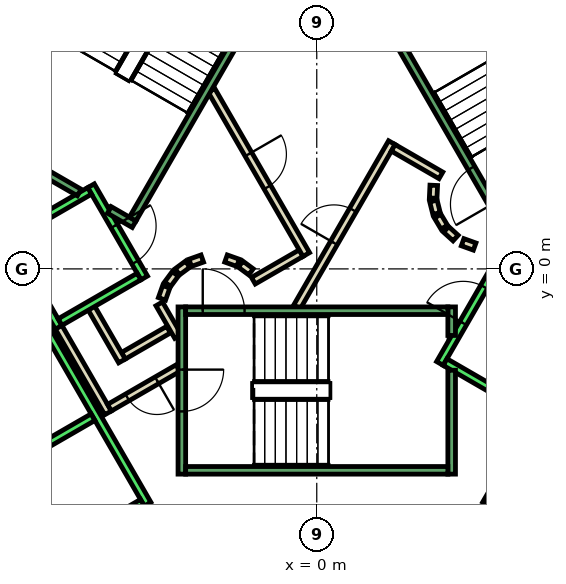
"""IFC4 building model, lengths in metres.
Left out: names, types, materials, properties, quantities, classifications, styles, units other than length and angle.
Written with IfcOpenShell. Run it as: python <this file> out.ifc"""

import sys

from ifc_helpers import new_model, si_unit, direction, frame, frame_2d, origin, place, context, subcontext, project, spatial, polyline, rectangle, outline, extrude, element, fill, save


model = new_model("IFC4")
c1 = context("Model", 3, precision=1e-05, world=origin(), true_north=direction((0.0, 1.0)))
c2 = subcontext(c1, "Body", "Model", "MODEL_VIEW")
j1 = project(units=[si_unit("LENGTHUNIT", "METRE"), si_unit("PLANEANGLEUNIT", "RADIAN")], contexts=[c1])
p1 = place(None, origin())
s1 = spatial("IfcSite", under=j1, at=p1, CompositionType="ELEMENT")
p2 = place(p1, origin())
s2 = spatial("IfcBuilding", under=s1, at=p2, CompositionType="ELEMENT")
p3 = place(p2, frame((0.0, 0.0, 132.8)))
s3 = spatial("IfcBuildingStorey", under=s2, at=p3, CompositionType="ELEMENT", Elevation=132.8)
p4 = place(p3, frame((0.0, 0.0, -0.6)))
e1 = element("IfcWall", 1, at=p4, inside=s3, PredefinedType="SHEAR", context=c2, shape_type="SweptSolid", body=[
    extrude(outline(polyline([(-12.267, 5.252), (-11.575, 4.852), (-6.466, 13.7), (-6.928, 14.5), (-12.267, 5.252)])), origin(), (0.0, 0.0, 1.0), 5.4),
])
p5 = place(p3, frame((0.0, 0.0, -0.6)))
e2 = element("IfcWall", 2, at=p5, inside=s3, PredefinedType="SHEAR", context=c2, shape_type="SweptSolid", body=[
    extrude(outline(polyline([(-13.856, 2.5), (-6.928, -9.5), (-6.466, -8.7), (-12.933, 2.5), (-13.856, 2.5)])), origin(), (0.0, 0.0, 1.0), 5.4),
])
p6 = place(p3, frame((-3.9, -1.599, 0.0), z_axis=(0.0, 0.0, 1.0), x_axis=(-0.865969445389, -0.500096910261, 0.0)))
e3 = element("IfcWall", 3, at=p6, inside=s3, PredefinedType="PARTITIONING", context=c2, shape_type="SweptSolid", body=[
    extrude(rectangle(XDim=1.373, YDim=0.2, at=frame_2d((0.687, 0.0))), origin(), (0.0, 0.0, 1.0), 4.8),
])
p7 = place(p3, frame((-5.126, -2.422, 0.0), z_axis=(0.0, 0.0, 1.0), x_axis=(-0.500062241894, 0.865989465428, 0.0)))
e4 = element("IfcWall", 4, at=p7, inside=s3, PredefinedType="PARTITIONING", context=c2, shape_type="SweptSolid", body=[
    extrude(rectangle(XDim=1.7, YDim=0.2, at=frame_2d((0.85, 0.0))), origin(), (0.0, 0.0, 1.0), 4.8),
])
p8 = place(p3, frame((-5.492, -3.788, 0.0), z_axis=(0.0, 0.0, 1.0), x_axis=(-0.500008949224, 0.866020236886, 0.0)))
e5 = element("IfcWall", 5, at=p8, inside=s3, PredefinedType="PARTITIONING", context=c2, shape_type="SweptSolid", body=[
    extrude(rectangle(XDim=2.68, YDim=0.2, at=frame_2d((1.34, 0.0))), origin(), (0.0, 0.0, 1.0), 4.8),
])
p9 = place(p3, frame((-4.145, -0.92, 0.0), z_axis=(0.0, 0.0, 1.0), x_axis=(0.499743786207, -0.866173278362, 0.0)))
e6 = element("IfcWall", 6, at=p9, inside=s3, PredefinedType="PARTITIONING", context=c2, shape_type="SweptSolid", body=[
    extrude(rectangle(XDim=0.991, YDim=0.2, at=frame_2d((0.495, 0.0))), origin(), (0.0, 0.0, 1.0), 4.8),
])
p10 = place(p3, frame((-3.65, -2.61, 0.0), z_axis=(0.0, 0.0, 1.0), x_axis=(-0.866072462134, -0.499918483688, 0.0)))
e7 = element("IfcWall", 7, at=p10, inside=s3, PredefinedType="PARTITIONING", context=c2, shape_type="SweptSolid", body=[
    extrude(rectangle(XDim=2.084, YDim=0.2, at=frame_2d((1.042, 0.0))), origin(), (0.0, 0.0, 1.0), 4.8),
])
p11 = place(p10, frame((0.642, 0.0, 0.0)))
e8 = element("IfcOpeningElement", 8, at=p11, cuts=e7, PredefinedType="OPENING", context=c2, shape_type="SweptSolid", body=[
    extrude(rectangle(XDim=0.9, YDim=2.1, at=frame_2d((0.45, 1.05))), frame((0.0, 0.11, 0.0), z_axis=(0.0, -1.0, 0.0), x_axis=(1.0, 0.0, 0.0)), (0.0, 0.0, 1.0), 0.22),
])
p12 = place(p3, frame((3.079, 2.199, 0.0), z_axis=(0.0, 0.0, 1.0), x_axis=(-0.047771483479, -0.998858290933, 0.0)))
e9 = element("IfcWall", 9, at=p12, inside=s3, PredefinedType="PARTITIONING", context=c2, shape_type="SweptSolid", body=[
    extrude(rectangle(XDim=0.337, YDim=0.2, at=frame_2d((0.169, 0.0))), origin(), (0.0, 0.0, 1.0), 4.8),
])
p13 = place(p3, frame((3.07, 1.786, 0.0), z_axis=(0.0, 0.0, 1.0), x_axis=(0.242705583207, -0.970099994784, 0.0)))
e10 = element("IfcWall", 10, at=p13, inside=s3, PredefinedType="PARTITIONING", context=c2, shape_type="SweptSolid", body=[
    extrude(rectangle(XDim=0.338, YDim=0.2, at=frame_2d((0.169, 0.0))), origin(), (0.0, 0.0, 1.0), 4.8),
])
for number, where, z_axis, x_axis in (
    (11, (3.182, 1.388, 0.0), (0.0, 0.0, 1.0), (0.512, -0.859, 0.0)),
    (12, (3.404, 1.039, 0.0), (0.0, 0.0, 1.0), (0.74, -0.672, 0.0)),
):
    element("IfcWall", number, at=place(p3, frame(where, z_axis=z_axis, x_axis=x_axis)), inside=s3, PredefinedType="PARTITIONING", context=c2, shape_type="SweptSolid", body=[
        extrude(rectangle(XDim=0.338, YDim=0.2, at=frame_2d((0.169, 0.0))), origin(), (0.0, 0.0, 1.0), 4.8),
    ])
p14 = place(p3, frame((3.838, 0.702, 0.0), z_axis=(0.0, 0.0, 1.0), x_axis=(0.941035081519, -0.338308993895, 0.0)))
e13 = element("IfcWall", 13, at=p14, inside=s3, PredefinedType="PARTITIONING", context=c2, shape_type="SweptSolid", body=[
    extrude(rectangle(XDim=0.337, YDim=0.2, at=frame_2d((0.168, 0.0))), origin(), (0.0, 0.0, 1.0), 4.8),
])
p15 = place(p3, frame((-0.52, -1.0, 0.0), z_axis=(0.0, 0.0, 1.0), x_axis=(0.50011622646, 0.865958290007, 0.0)))
e14 = element("IfcWall", 14, at=p15, inside=s3, PredefinedType="PARTITIONING", context=c2, shape_type="SweptSolid", body=[
    extrude(rectangle(XDim=4.991, YDim=0.2, at=frame_2d((2.496, 0.0))), origin(), (0.0, 0.0, 1.0), 4.8),
])
p16 = place(p15, frame((1.945, 0.0, 0.0)))
e15 = element("IfcOpeningElement", 15, at=p16, cuts=e14, PredefinedType="OPENING", context=c2, shape_type="SweptSolid", body=[
    extrude(rectangle(XDim=1.0, YDim=2.1, at=frame_2d((0.5, 1.05))), frame((0.0, 0.11, 0.0), z_axis=(0.0, -1.0, 0.0), x_axis=(1.0, 0.0, 0.0)), (0.0, 0.0, 1.0), 0.22),
])
p17 = place(p3, frame((2.012, 3.186, 0.0), z_axis=(0.0, 0.0, 1.0), x_axis=(0.865891012941, -0.500232699559, 0.0)))
e16 = element("IfcWall", 16, at=p17, inside=s3, PredefinedType="PARTITIONING", context=c2, shape_type="SweptSolid", body=[
    extrude(rectangle(XDim=1.449, YDim=0.2, at=frame_2d((0.725, 0.0))), origin(), (0.0, 0.0, 1.0), 4.8),
])
p18 = place(p3, frame((-0.412, 0.414, 0.0), z_axis=(0.0, 0.0, 1.0), x_axis=(-0.866017369001, -0.500013916395, 0.0)))
e17 = element("IfcWall", 17, at=p18, inside=s3, PredefinedType="PARTITIONING", context=c2, shape_type="SweptSolid", body=[
    extrude(rectangle(XDim=1.45, YDim=0.2, at=frame_2d((0.725, 0.0))), origin(), (0.0, 0.0, 1.0), 4.8),
])
p19 = place(p3, frame((-1.731, -0.077, 0.0), z_axis=(0.0, 0.0, 1.0), x_axis=(-0.804311165252, 0.594208338422, 0.0)))
e18 = element("IfcWall", 18, at=p19, inside=s3, PredefinedType="PARTITIONING", context=c2, shape_type="SweptSolid", body=[
    extrude(rectangle(XDim=0.338, YDim=0.2, at=frame_2d((0.169, 0.0))), origin(), (0.0, 0.0, 1.0), 4.8),
])
p20 = place(p3, frame((-2.07, 0.16, 0.0), z_axis=(0.0, 0.0, 1.0), x_axis=(-0.942199461132, 0.335052496547, 0.0)))
e19 = element("IfcWall", 19, at=p20, inside=s3, PredefinedType="PARTITIONING", context=c2, shape_type="SweptSolid", body=[
    extrude(rectangle(XDim=0.337, YDim=0.2, at=frame_2d((0.169, 0.0))), origin(), (0.0, 0.0, 1.0), 4.8),
])
p21 = place(p3, frame((-3.012, 0.273, 0.0), z_axis=(0.0, 0.0, 1.0), x_axis=(-0.942280615813, -0.334824194261, 0.0)))
e20 = element("IfcWall", 20, at=p21, inside=s3, PredefinedType="PARTITIONING", context=c2, shape_type="SweptSolid", body=[
    extrude(rectangle(XDim=0.338, YDim=0.2, at=frame_2d((0.169, 0.0))), origin(), (0.0, 0.0, 1.0), 4.8),
])
p22 = place(p3, frame((-3.397, 0.124, 0.0), z_axis=(0.0, 0.0, 1.0), x_axis=(-0.804311165252, -0.594208338422, 0.0)))
e21 = element("IfcWall", 21, at=p22, inside=s3, PredefinedType="PARTITIONING", context=c2, shape_type="SweptSolid", body=[
    extrude(rectangle(XDim=0.338, YDim=0.2, at=frame_2d((0.169, 0.0))), origin(), (0.0, 0.0, 1.0), 4.8),
])
p23 = place(p3, frame((-3.723, -0.131, 0.0), z_axis=(0.0, 0.0, 1.0), x_axis=(-0.594675113454, -0.803966112121, 0.0)))
e22 = element("IfcWall", 22, at=p23, inside=s3, PredefinedType="PARTITIONING", context=c2, shape_type="SweptSolid", body=[
    extrude(rectangle(XDim=0.338, YDim=0.2, at=frame_2d((0.169, 0.0))), origin(), (0.0, 0.0, 1.0), 4.8),
])
p24 = place(p3, frame((-3.96, -0.47, 0.0), z_axis=(0.0, 0.0, 1.0), x_axis=(-0.334824194261, -0.942280615813, 0.0)))
e23 = element("IfcWall", 23, at=p24, inside=s3, PredefinedType="PARTITIONING", context=c2, shape_type="SweptSolid", body=[
    extrude(rectangle(XDim=0.338, YDim=0.2, at=frame_2d((0.169, 0.0))), origin(), (0.0, 0.0, 1.0), 4.8),
])
p25 = place(p3, frame((-2.771, 4.7, 0.0), z_axis=(0.0, 0.0, 1.0), x_axis=(0.499969479948, -0.866043023828, 0.0)))
e24 = element("IfcWall", 24, at=p25, inside=s3, PredefinedType="PARTITIONING", context=c2, shape_type="SweptSolid", body=[
    extrude(rectangle(XDim=4.99, YDim=0.2, at=frame_2d((2.495, 0.0))), origin(), (0.0, 0.0, 1.0), 4.8),
])
p26 = place(p25, frame((1.945, 0.0, 0.0)))
e25 = element("IfcOpeningElement", 25, at=p26, cuts=e24, PredefinedType="OPENING", context=c2, shape_type="SweptSolid", body=[
    extrude(rectangle(XDim=1.0, YDim=2.1, at=frame_2d((0.5, 1.05))), frame((0.0, 0.11, 0.0), z_axis=(0.0, -1.0, 0.0), x_axis=(1.0, 0.0, 0.0)), (0.0, 0.0, 1.0), 0.22),
])
p27 = place(p3, frame((-5.94, 2.188, 0.0), z_axis=(0.0, 0.0, 1.0), x_axis=(0.49994636267, -0.866056369097, 0.0)))
e26 = element("IfcWall", 26, at=p27, inside=s3, PredefinedType="STANDARD", context=c2, shape_type="SweptSolid", body=[
    extrude(rectangle(XDim=2.8, YDim=0.2, at=frame_2d((1.4, 0.0))), origin(), (0.0, 0.0, 1.0), 4.8),
])
p28 = place(p27, frame((1.225, 0.0, 0.0)))
e27 = element("IfcOpeningElement", 27, at=p28, cuts=e26, PredefinedType="OPENING", context=c2, shape_type="SweptSolid", body=[
    extrude(rectangle(XDim=1.1, YDim=2.1, at=frame_2d((0.55, 1.05))), frame((0.0, 0.11, 0.0), z_axis=(0.0, -1.0, 0.0), x_axis=(1.0, 0.0, 0.0)), (0.0, 0.0, 1.0), 0.22),
])
p29 = place(p3, frame((-8.192, 0.888, 0.0), z_axis=(0.0, 0.0, 1.0), x_axis=(0.49994636267, -0.866056369097, 0.0)))
e28 = element("IfcWall", 28, at=p29, inside=s3, PredefinedType="STANDARD", context=c2, shape_type="SweptSolid", body=[
    extrude(rectangle(XDim=2.8, YDim=0.2, at=frame_2d((1.4, 0.0))), origin(), (0.0, 0.0, 1.0), 4.8),
])
for number, where, z_axis, x_axis in (
    (29, (-5.977, 2.052, 0.0), (0.0, 0.0, 1.0), (-0.866, -0.5, 0.0)),
    (30, (-4.677, -0.2, 0.0), (0.0, 0.0, 1.0), (-0.866, -0.5, 0.0)),
):
    element("IfcWall", number, at=place(p3, frame(where, z_axis=z_axis, x_axis=x_axis)), inside=s3, PredefinedType="STANDARD", context=c2, shape_type="SweptSolid", body=[
        extrude(rectangle(XDim=2.399, YDim=0.2, at=frame_2d((1.2, 0.0))), origin(), (0.0, 0.0, 1.0), 4.8),
    ])
p30 = place(p3, frame((-9.751, 2.99, 0.0), z_axis=(0.0, 0.0, 1.0), x_axis=(0.50000090737, -0.866024879913, 0.0)))
e31 = element("IfcWall", 31, at=p30, inside=s3, PredefinedType="STANDARD", context=c2, shape_type="SweptSolid", body=[
    extrude(rectangle(XDim=10.6, YDim=0.2, at=frame_2d((5.3, 0.0))), origin(), (0.0, 0.0, 1.0), 4.8),
])
for number, where, z_axis, x_axis in (
    (32, (-5.888, -3.902, 0.0), (0.0, 0.0, 1.0), (-0.866, -0.5, 0.0)),
    (33, (-4.588, -6.153, 0.0), (0.0, 0.0, 1.0), (-0.866, -0.5, 0.0)),
):
    element("IfcWall", number, at=place(p3, frame(where, z_axis=z_axis, x_axis=x_axis)), inside=s3, PredefinedType="STANDARD", context=c2, shape_type="SweptSolid", body=[
        extrude(rectangle(XDim=2.5, YDim=0.2, at=frame_2d((1.25, 0.0))), origin(), (0.0, 0.0, 1.0), 4.8),
    ])
p31 = place(p3, frame((3.24, -2.488, 0.0), z_axis=(0.0, 0.0, 1.0), x_axis=(0.49994636267, 0.866056369097, 0.0)))
e34 = element("IfcWall", 34, at=p31, inside=s3, PredefinedType="STANDARD", context=c2, shape_type="SweptSolid", body=[
    extrude(rectangle(XDim=2.8, YDim=0.2, at=frame_2d((1.4, 0.0))), origin(), (0.0, 0.0, 1.0), 4.8),
])
p32 = place(p31, frame((1.225, 0.0, 0.0)))
e35 = element("IfcOpeningElement", 35, at=p32, cuts=e34, PredefinedType="OPENING", context=c2, shape_type="SweptSolid", body=[
    extrude(rectangle(XDim=1.1, YDim=2.1, at=frame_2d((0.55, 1.05))), frame((0.0, 0.11, 0.0), z_axis=(0.0, -1.0, 0.0), x_axis=(1.0, 0.0, 0.0)), (0.0, 0.0, 1.0), 0.22),
])
p33 = place(p3, frame((3.377, -2.452, 0.0), z_axis=(0.0, 0.0, 1.0), x_axis=(0.865955154139, -0.50012165622, 0.0)))
e36 = element("IfcWall", 36, at=p33, inside=s3, PredefinedType="STANDARD", context=c2, shape_type="SweptSolid", body=[
    extrude(rectangle(XDim=2.4, YDim=0.2, at=frame_2d((1.2, 0.0))), origin(), (0.0, 0.0, 1.0), 4.8),
])
p34 = place(p3, frame((4.451, -6.19, 0.0), z_axis=(0.0, 0.0, 1.0), x_axis=(0.50000090737, 0.866024879913, 0.0)))
e37 = element("IfcWall", 37, at=p34, inside=s3, PredefinedType="STANDARD", context=c2, shape_type="SweptSolid", body=[
    extrude(rectangle(XDim=10.6, YDim=0.2, at=frame_2d((5.3, 0.0))), origin(), (0.0, 0.0, 1.0), 4.8),
])
p35 = place(p3, frame((-3.55, -1.0, 0.0), z_axis=(0.0, 0.0, 1.0), x_axis=(0.0, -1.0, 0.0)))
e38 = element("IfcWall", 38, at=p35, inside=s3, PredefinedType="STANDARD", context=c2, shape_type="SweptSolid", body=[
    extrude(rectangle(XDim=4.4, YDim=0.2, at=frame_2d((2.2, 0.0))), origin(), (0.0, 0.0, 1.0), 4.8),
])
p36 = place(p35, frame((1.65, 0.0, 0.0)))
e39 = element("IfcOpeningElement", 39, at=p36, cuts=e38, PredefinedType="OPENING", context=c2, shape_type="SweptSolid", body=[
    extrude(rectangle(XDim=1.1, YDim=2.2, at=frame_2d((0.55, 1.1))), frame((0.0, 0.11, 0.0), z_axis=(0.0, -1.0, 0.0), x_axis=(1.0, 0.0, 0.0)), (0.0, 0.0, 1.0), 0.22),
])
p37 = place(p3, frame((3.55, -2.667, 0.0), z_axis=(0.0, 0.0, 1.0), x_axis=(0.0, -1.0, 0.0)))
e40 = element("IfcWall", 40, at=p37, inside=s3, PredefinedType="STANDARD", context=c2, shape_type="SweptSolid", body=[
    extrude(rectangle(XDim=2.733, YDim=0.2, at=frame_2d((1.366, 0.0))), origin(), (0.0, 0.0, 1.0), 4.8),
])
p38 = place(p3, frame((3.55, -1.0, 0.0), z_axis=(0.0, 0.0, 1.0), x_axis=(0.0, -1.0, 0.0)))
e41 = element("IfcWall", 41, at=p38, inside=s3, PredefinedType="STANDARD", context=c2, shape_type="SweptSolid", body=[
    extrude(rectangle(XDim=0.751, YDim=0.2, at=frame_2d((0.375, 0.0))), origin(), (0.0, 0.0, 1.0), 4.8),
])
p39 = place(p3, frame((-3.45, -1.1, 0.0), z_axis=(0.0, 0.0, 1.0), x_axis=(1.0, 0.0, 0.0)))
e42 = element("IfcWall", 42, at=p39, inside=s3, PredefinedType="STANDARD", context=c2, shape_type="SweptSolid", body=[
    extrude(rectangle(XDim=6.9, YDim=0.2, at=frame_2d((3.45, 0.0))), origin(), (0.0, 0.0, 1.0), 4.8),
])
p40 = place(p39, frame((0.45, 0.0, 0.0)))
e43 = element("IfcOpeningElement", 43, at=p40, cuts=e42, PredefinedType="OPENING", context=c2, shape_type="SweptSolid", body=[
    extrude(rectangle(XDim=1.1, YDim=2.2, at=frame_2d((0.55, 1.1))), frame((0.0, 0.11, 0.0), z_axis=(0.0, -1.0, 0.0), x_axis=(1.0, 0.0, 0.0)), (0.0, 0.0, 1.0), 0.22),
])
p41 = place(p3, frame((-3.45, -5.3, 0.0), z_axis=(0.0, 0.0, 1.0), x_axis=(1.0, 0.0, 0.0)))
e44 = element("IfcWall", 44, at=p41, inside=s3, PredefinedType="STANDARD", context=c2, shape_type="SweptSolid", body=[
    extrude(rectangle(XDim=6.9, YDim=0.2, at=frame_2d((3.45, 0.0))), origin(), (0.0, 0.0, 1.0), 4.8),
])
p42 = place(p3, frame((4.843, 1.312, 0.0), z_axis=(0.0, 0.0, 1.0), x_axis=(-0.499963383562, 0.866046543262, 0.0)))
e45 = element("IfcWall", 45, at=p42, inside=s3, PredefinedType="STANDARD", context=c2, shape_type="SweptSolid", body=[
    extrude(rectangle(XDim=6.9, YDim=0.2, at=frame_2d((3.45, 0.0))), origin(), (0.0, 0.0, 1.0), 4.8),
])
p43 = place(p42, frame((0.45, 0.0, 0.0)))
e46 = element("IfcOpeningElement", 46, at=p43, cuts=e45, PredefinedType="OPENING", context=c2, shape_type="SweptSolid", body=[
    extrude(rectangle(XDim=1.1, YDim=2.2, at=frame_2d((0.55, 1.1))), frame((0.0, 0.11, 0.0), z_axis=(0.0, -1.0, 0.0), x_axis=(1.0, 0.0, 0.0)), (0.0, 0.0, 1.0), 0.22),
])
p44 = place(p3, frame((-6.25, 2.01, 0.0), z_axis=(0.0, 0.0, 1.0), x_axis=(-0.86611865017, 0.499838457731, 0.0)))
e47 = element("IfcWall", 47, at=p44, inside=s3, PredefinedType="STANDARD", context=c2, shape_type="SweptSolid", body=[
    extrude(rectangle(XDim=2.733, YDim=0.2, at=frame_2d((1.366, 0.0))), origin(), (0.0, 0.0, 1.0), 4.8),
])
p45 = place(p3, frame((-4.806, 1.176, 0.0), z_axis=(0.0, 0.0, 1.0), x_axis=(-0.866558586415, 0.499075361355, 0.0)))
e48 = element("IfcWall", 48, at=p45, inside=s3, PredefinedType="STANDARD", context=c2, shape_type="SweptSolid", body=[
    extrude(rectangle(XDim=0.751, YDim=0.2, at=frame_2d((0.376, 0.0))), origin(), (0.0, 0.0, 1.0), 4.8),
])
p46 = place(p3, frame((-1.393, 7.288, 0.0), z_axis=(0.0, 0.0, 1.0), x_axis=(-0.499963383562, -0.866046543262, 0.0)))
e49 = element("IfcWall", 49, at=p46, inside=s3, PredefinedType="STANDARD", context=c2, shape_type="SweptSolid", body=[
    extrude(rectangle(XDim=6.9, YDim=0.2, at=frame_2d((3.45, 0.0))), origin(), (0.0, 0.0, 1.0), 4.8),
])
p47 = place(p46, frame((0.45, 0.0, 0.0)))
e50 = element("IfcOpeningElement", 50, at=p47, cuts=e49, PredefinedType="OPENING", context=c2, shape_type="SweptSolid", body=[
    extrude(rectangle(XDim=1.1, YDim=2.2, at=frame_2d((0.55, 1.1))), frame((0.0, 0.11, 0.0), z_axis=(0.0, -1.0, 0.0), x_axis=(1.0, 0.0, 0.0)), (0.0, 0.0, 1.0), 0.22),
])
p48 = place(p3, frame((-5.03, 9.388, 0.0), z_axis=(0.0, 0.0, 1.0), x_axis=(-0.499978703459, -0.866037698999, 0.0)))
e51 = element("IfcWall", 51, at=p48, inside=s3, PredefinedType="STANDARD", context=c2, shape_type="SweptSolid", body=[
    extrude(rectangle(XDim=6.9, YDim=0.2, at=frame_2d((3.45, 0.0))), origin(), (0.0, 0.0, 1.0), 4.8),
])
p49 = place(p16, origin())
e52 = element("IfcDoor", 52, at=p49, inside=s3, OperationType="SINGLE_SWING_LEFT", PredefinedType="DOOR", context=c2, shape_type="SweptSolid", body=[
    extrude(rectangle(XDim=1.0, YDim=2.1, at=frame_2d((0.5, 1.05))), frame((0.0, 0.025, 0.0), z_axis=(0.0, -1.0, 0.0), x_axis=(1.0, 0.0, 0.0)), (0.0, 0.0, 1.0), 0.05),
])
fill(e15, e52)
p50 = place(p26, origin())
e53 = element("IfcDoor", 53, at=p50, inside=s3, OperationType="SINGLE_SWING_RIGHT", PredefinedType="DOOR", context=c2, shape_type="SweptSolid", body=[
    extrude(rectangle(XDim=1.0, YDim=2.1, at=frame_2d((0.5, 1.05))), frame((0.0, 0.025, 0.0), z_axis=(0.0, -1.0, 0.0), x_axis=(1.0, 0.0, 0.0)), (0.0, 0.0, 1.0), 0.05),
])
fill(e25, e53)
p51 = place(p11, origin())
e54 = element("IfcDoor", 54, at=p51, inside=s3, OperationType="SINGLE_SWING_LEFT", PredefinedType="DOOR", context=c2, shape_type="SweptSolid", body=[
    extrude(rectangle(XDim=0.9, YDim=2.1, at=frame_2d((0.45, 1.05))), frame((0.0, 0.025, 0.0), z_axis=(0.0, -1.0, 0.0), x_axis=(1.0, 0.0, 0.0)), (0.0, 0.0, 1.0), 0.05),
])
fill(e8, e54)
p52 = place(p32, origin())
e55 = element("IfcDoor", 55, at=p52, inside=s3, OperationType="SLIDING_TO_LEFT", PredefinedType="DOOR", context=c2, shape_type="SweptSolid", body=[
    extrude(rectangle(XDim=1.1, YDim=2.1, at=frame_2d((0.55, 1.05))), frame((0.0, 0.025, 0.0), z_axis=(0.0, -1.0, 0.0), x_axis=(1.0, 0.0, 0.0)), (0.0, 0.0, 1.0), 0.05),
])
fill(e35, e55)
p53 = place(p28, origin())
e56 = element("IfcDoor", 56, at=p53, inside=s3, OperationType="SLIDING_TO_LEFT", PredefinedType="DOOR", context=c2, shape_type="SweptSolid", body=[
    extrude(rectangle(XDim=1.1, YDim=2.1, at=frame_2d((0.55, 1.05))), frame((0.0, 0.025, 0.0), z_axis=(0.0, -1.0, 0.0), x_axis=(1.0, 0.0, 0.0)), (0.0, 0.0, 1.0), 0.05),
])
fill(e27, e56)
p54 = place(p40, origin())
e57 = element("IfcDoor", 57, at=p54, inside=s3, OperationType="SINGLE_SWING_LEFT", PredefinedType="DOOR", context=c2, shape_type="SweptSolid", body=[
    extrude(rectangle(XDim=1.1, YDim=2.2, at=frame_2d((0.55, 1.1))), frame((0.0, 0.025, 0.0), z_axis=(0.0, -1.0, 0.0), x_axis=(1.0, 0.0, 0.0)), (0.0, 0.0, 1.0), 0.05),
])
fill(e43, e57)
p55 = place(p36, origin())
e58 = element("IfcDoor", 58, at=p55, inside=s3, OperationType="SINGLE_SWING_LEFT", PredefinedType="DOOR", context=c2, shape_type="SweptSolid", body=[
    extrude(rectangle(XDim=1.1, YDim=2.2, at=frame_2d((0.55, 1.1))), frame((0.0, 0.025, 0.0), z_axis=(0.0, -1.0, 0.0), x_axis=(1.0, 0.0, 0.0)), (0.0, 0.0, 1.0), 0.05),
])
fill(e39, e58)
p56 = place(p43, origin())
e59 = element("IfcDoor", 59, at=p56, inside=s3, OperationType="SINGLE_SWING_LEFT", PredefinedType="DOOR", context=c2, shape_type="SweptSolid", body=[
    extrude(rectangle(XDim=1.1, YDim=2.2, at=frame_2d((0.55, 1.1))), frame((0.0, 0.025, 0.0), z_axis=(0.0, -1.0, 0.0), x_axis=(1.0, 0.0, 0.0)), (0.0, 0.0, 1.0), 0.05),
])
fill(e46, e59)
save(model, sys.argv[1])
